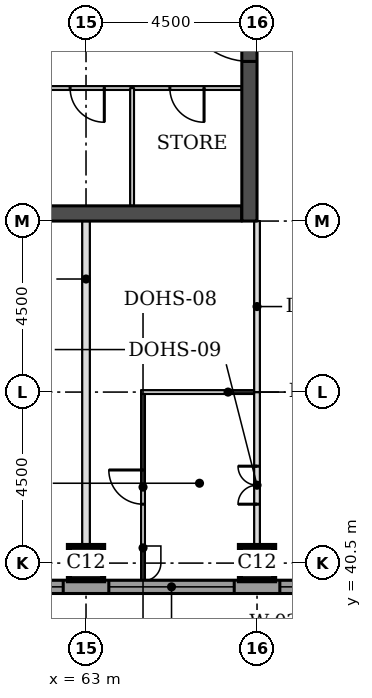
"""IFC4 building model, lengths in metres.
Left out: names, types, materials, properties, quantities, classifications, styles, units other than length and angle.
Written with IfcOpenShell. Run it as: python <this file> out.ifc"""

import sys

from ifc_helpers import new_model, si_unit, direction, frame, frame_2d, origin, origin_2d, place, context, subcontext, project, spatial, rectangle, extrude, element, fill, save


model = new_model("IFC4")
c1 = context("Model", 3, precision=1e-05, world=origin(), true_north=direction((0.0, 1.0)))
c2 = subcontext(c1, "Body", "Model", "MODEL_VIEW")
j1 = project(units=[si_unit("LENGTHUNIT", "METRE"), si_unit("PLANEANGLEUNIT", "RADIAN")], contexts=[c1])
p1 = place(None, origin())
s1 = spatial("IfcSite", under=j1, at=p1, CompositionType="ELEMENT")
p2 = place(p1, origin())
s2 = spatial("IfcBuilding", under=s1, at=p2, CompositionType="ELEMENT")
p3 = place(p2, frame((0.0, 0.0, 260.0)))
s3 = spatial("IfcBuildingStorey", under=s2, at=p3, CompositionType="ELEMENT", Elevation=260.0)
for number, where, z_axis, x_axis in (
    (1, (63.0, 40.5, 0.0), (0.0, 0.0, 1.0), (1.0, 0.0, 0.0)),
    (2, (67.5, 40.5, 0.0), (0.0, 0.0, 1.0), (1.0, 0.0, 0.0)),
):
    element("IfcColumn", number, at=place(p3, frame(where, z_axis=z_axis, x_axis=x_axis)), inside=s3, PredefinedType="COLUMN", context=c2, shape_type="SweptSolid", body=[
        extrude(rectangle(XDim=0.9, YDim=0.9, at=origin_2d()), origin(), (0.0, 0.0, 1.0), 3.7),
    ])
p4 = place(p3, frame((45.4, 49.7, 0.0), z_axis=(0.0, 0.0, 1.0), x_axis=(1.0, 0.0, 0.0)))
e3 = element("IfcWall", 3, at=p4, inside=s3, PredefinedType="SHEAR", context=c2, shape_type="SweptSolid", body=[
    extrude(rectangle(XDim=21.7, YDim=0.4, at=frame_2d((10.85, 0.0))), origin(), (0.0, 0.0, 1.0), 3.7),
])
p5 = place(p3, frame((67.3, 49.5, 0.0), z_axis=(0.0, 0.0, 1.0), x_axis=(0.0, 1.0, 0.0)))
e4 = element("IfcWall", 4, at=p5, inside=s3, PredefinedType="SHEAR", context=c2, shape_type="SweptSolid", body=[
    extrude(rectangle(XDim=22.5, YDim=0.4, at=frame_2d((11.25, 0.0))), origin(), (0.0, 0.0, 1.0), 3.7),
])
p6 = place(p5, frame((4.2, 0.0, 0.0)))
e5 = element("IfcOpeningElement", 5, at=p6, cuts=e4, PredefinedType="OPENING", context=c2, shape_type="SweptSolid", body=[
    extrude(rectangle(XDim=1.8, YDim=2.1, at=frame_2d((0.9, 1.05))), frame((0.0, 0.21, 0.0), z_axis=(0.0, -1.0, 0.0), x_axis=(1.0, 0.0, 0.0)), (0.0, 0.0, 1.0), 0.42),
])
p7 = place(p5, frame((6.9, 0.0, 0.0)))
e6 = element("IfcOpeningElement", 6, at=p7, cuts=e4, PredefinedType="OPENING", context=c2, shape_type="SweptSolid", body=[
    extrude(rectangle(XDim=1.1, YDim=2.1, at=frame_2d((0.55, 1.05))), frame((0.0, 0.21, 0.0), z_axis=(0.0, -1.0, 0.0), x_axis=(1.0, 0.0, 0.0)), (0.0, 0.0, 1.0), 0.42),
])
p8 = place(p5, frame((13.6, 0.0, 0.0)))
e7 = element("IfcOpeningElement", 7, at=p8, cuts=e4, PredefinedType="OPENING", context=c2, shape_type="SweptSolid", body=[
    extrude(rectangle(XDim=1.1, YDim=2.1, at=frame_2d((0.55, 1.05))), frame((0.0, 0.21, 0.0), z_axis=(0.0, -1.0, 0.0), x_axis=(1.0, 0.0, 0.0)), (0.0, 0.0, 1.0), 0.42),
])
p9 = place(p5, frame((16.5, 0.0, 0.0)))
e8 = element("IfcOpeningElement", 8, at=p9, cuts=e4, PredefinedType="OPENING", context=c2, shape_type="SweptSolid", body=[
    extrude(rectangle(XDim=1.8, YDim=2.1, at=frame_2d((0.9, 1.05))), frame((0.0, 0.21, 0.0), z_axis=(0.0, -1.0, 0.0), x_axis=(1.0, 0.0, 0.0)), (0.0, 0.0, 1.0), 0.42),
])
p10 = place(p3, frame((36.0, 39.875, 0.0), z_axis=(0.0, 0.0, 1.0), x_axis=(1.0, 0.0, 0.0)))
e9 = element("IfcWall", 9, at=p10, inside=s3, PredefinedType="STANDARD", context=c2, shape_type="SweptSolid", body=[
    extrude(rectangle(XDim=36.331, YDim=0.35, at=frame_2d((18.166, 0.0))), origin(), (0.0, 0.0, 1.0), 3.425),
])
p11 = place(p10, frame((0.6, 0.0, 0.9)))
e10 = element("IfcOpeningElement", 10, at=p11, cuts=e9, PredefinedType="OPENING", context=c2, shape_type="SweptSolid", body=[
    extrude(rectangle(XDim=3.3, YDim=1.9, at=frame_2d((1.65, 0.95))), frame((0.0, 0.185, 0.0), z_axis=(0.0, -1.0, 0.0), x_axis=(1.0, 0.0, 0.0)), (0.0, 0.0, 1.0), 0.37),
])
p12 = place(p10, frame((5.1, 0.0, 0.9)))
e11 = element("IfcOpeningElement", 11, at=p12, cuts=e9, PredefinedType="OPENING", context=c2, shape_type="SweptSolid", body=[
    extrude(rectangle(XDim=3.3, YDim=1.9, at=frame_2d((1.65, 0.95))), frame((0.0, 0.185, 0.0), z_axis=(0.0, -1.0, 0.0), x_axis=(1.0, 0.0, 0.0)), (0.0, 0.0, 1.0), 0.37),
])
p13 = place(p10, frame((9.6, 0.0, 0.9)))
e12 = element("IfcOpeningElement", 12, at=p13, cuts=e9, PredefinedType="OPENING", context=c2, shape_type="SweptSolid", body=[
    extrude(rectangle(XDim=3.3, YDim=1.9, at=frame_2d((1.65, 0.95))), frame((0.0, 0.185, 0.0), z_axis=(0.0, -1.0, 0.0), x_axis=(1.0, 0.0, 0.0)), (0.0, 0.0, 1.0), 0.37),
])
p14 = place(p10, frame((14.1, 0.0, 0.9)))
e13 = element("IfcOpeningElement", 13, at=p14, cuts=e9, PredefinedType="OPENING", context=c2, shape_type="SweptSolid", body=[
    extrude(rectangle(XDim=3.3, YDim=1.9, at=frame_2d((1.65, 0.95))), frame((0.0, 0.185, 0.0), z_axis=(0.0, -1.0, 0.0), x_axis=(1.0, 0.0, 0.0)), (0.0, 0.0, 1.0), 0.37),
])
p15 = place(p10, frame((18.6, 0.0, 0.9)))
e14 = element("IfcOpeningElement", 14, at=p15, cuts=e9, PredefinedType="OPENING", context=c2, shape_type="SweptSolid", body=[
    extrude(rectangle(XDim=3.3, YDim=1.9, at=frame_2d((1.65, 0.95))), frame((0.0, 0.185, 0.0), z_axis=(0.0, -1.0, 0.0), x_axis=(1.0, 0.0, 0.0)), (0.0, 0.0, 1.0), 0.37),
])
p16 = place(p10, frame((23.1, 0.0, 0.9)))
e15 = element("IfcOpeningElement", 15, at=p16, cuts=e9, PredefinedType="OPENING", context=c2, shape_type="SweptSolid", body=[
    extrude(rectangle(XDim=3.3, YDim=1.9, at=frame_2d((1.65, 0.95))), frame((0.0, 0.185, 0.0), z_axis=(0.0, -1.0, 0.0), x_axis=(1.0, 0.0, 0.0)), (0.0, 0.0, 1.0), 0.37),
])
p17 = place(p10, frame((27.6, 0.0, 0.9)))
e16 = element("IfcOpeningElement", 16, at=p17, cuts=e9, PredefinedType="OPENING", context=c2, shape_type="SweptSolid", body=[
    extrude(rectangle(XDim=3.3, YDim=1.9, at=frame_2d((1.65, 0.95))), frame((0.0, 0.185, 0.0), z_axis=(0.0, -1.0, 0.0), x_axis=(1.0, 0.0, 0.0)), (0.0, 0.0, 1.0), 0.37),
])
p18 = place(p10, frame((32.1, 0.0, 0.9)))
e17 = element("IfcOpeningElement", 17, at=p18, cuts=e9, PredefinedType="OPENING", context=c2, shape_type="SweptSolid", body=[
    extrude(rectangle(XDim=3.3, YDim=1.9, at=frame_2d((1.65, 0.95))), frame((0.0, 0.185, 0.0), z_axis=(0.0, -1.0, 0.0), x_axis=(1.0, 0.0, 0.0)), (0.0, 0.0, 1.0), 0.37),
])
p19 = place(p3, frame((64.45, 45.0, 0.0), z_axis=(0.0, 0.0, 1.0), x_axis=(1.0, 0.0, 0.0)))
e18 = element("IfcWall", 18, at=p19, inside=s3, PredefinedType="PARTITIONING", context=c2, shape_type="SweptSolid", body=[
    extrude(rectangle(XDim=2.975, YDim=0.1, at=frame_2d((1.488, 0.0))), origin(), (0.0, 0.0, 1.0), 3.45),
])
p20 = place(p3, frame((63.0, 40.05, 0.0), z_axis=(0.0, 0.0, 1.0), x_axis=(0.0, 1.0, 0.0)))
e19 = element("IfcWall", 19, at=p20, inside=s3, PredefinedType="PARTITIONING", context=c2, shape_type="SweptSolid", body=[
    extrude(rectangle(XDim=9.45, YDim=0.2, at=frame_2d((4.725, 0.0))), origin(), (0.0, 0.0, 1.0), 3.45),
])
p21 = place(p3, frame((64.5, 40.05, 0.0), z_axis=(0.0, 0.0, 1.0), x_axis=(0.0, 1.0, 0.0)))
e20 = element("IfcWall", 20, at=p21, inside=s3, PredefinedType="PARTITIONING", context=c2, shape_type="SweptSolid", body=[
    extrude(rectangle(XDim=4.9, YDim=0.1, at=frame_2d((2.45, 0.0))), origin(), (0.0, 0.0, 1.0), 3.45),
])
p22 = place(p21, frame((2.0, 0.0, 0.0)))
e21 = element("IfcOpeningElement", 21, at=p22, cuts=e20, PredefinedType="OPENING", context=c2, shape_type="SweptSolid", body=[
    extrude(rectangle(XDim=0.9, YDim=2.1, at=frame_2d((0.45, 1.05))), frame((0.0, 0.06, 0.0), z_axis=(0.0, -1.0, 0.0), x_axis=(1.0, 0.0, 0.0)), (0.0, 0.0, 1.0), 0.12),
])
p23 = place(p3, frame((67.5, 40.05, 0.0), z_axis=(0.0, 0.0, 1.0), x_axis=(0.0, 1.0, 0.0)))
e22 = element("IfcWall", 22, at=p23, inside=s3, PredefinedType="PARTITIONING", context=c2, shape_type="SweptSolid", body=[
    extrude(rectangle(XDim=4.95, YDim=0.15, at=frame_2d((2.475, 0.0))), origin(), (0.0, 0.0, 1.0), 2.922),
])
p24 = place(p23, frame((2.0, 0.0, 0.0)))
e23 = element("IfcOpeningElement", 23, at=p24, cuts=e22, PredefinedType="OPENING", context=c2, shape_type="SweptSolid", body=[
    extrude(rectangle(XDim=1.0, YDim=2.1, at=frame_2d((0.5, 1.05))), frame((0.0, 0.085, 0.0), z_axis=(0.0, -1.0, 0.0), x_axis=(1.0, 0.0, 0.0)), (0.0, 0.0, 1.0), 0.17),
])
p25 = place(p3, frame((67.5, 45.0, 0.0), z_axis=(0.0, 0.0, 1.0), x_axis=(0.0, 1.0, 0.0)))
e24 = element("IfcWall", 24, at=p25, inside=s3, PredefinedType="PARTITIONING", context=c2, shape_type="SweptSolid", body=[
    extrude(rectangle(XDim=4.5, YDim=0.15, at=frame_2d((2.25, 0.0))), origin(), (0.0, 0.0, 1.0), 2.922),
])
p26 = place(p3, frame((45.4, 53.0, 0.0), z_axis=(0.0, 0.0, 1.0), x_axis=(1.0, 0.0, 0.0)))
e25 = element("IfcWall", 25, at=p26, inside=s3, PredefinedType="PARTITIONING", context=c2, shape_type="SweptSolid", body=[
    extrude(rectangle(XDim=21.7, YDim=0.1, at=frame_2d((10.85, 0.0))), origin(), (0.0, 0.0, 1.0), 3.45),
])
p27 = place(p26, frame((19.806, 0.0, 0.0)))
e26 = element("IfcOpeningElement", 26, at=p27, cuts=e25, PredefinedType="OPENING", context=c2, shape_type="SweptSolid", body=[
    extrude(rectangle(XDim=0.9, YDim=2.1, at=frame_2d((0.45, 1.05))), frame((0.0, 0.06, 0.0), z_axis=(0.0, -1.0, 0.0), x_axis=(1.0, 0.0, 0.0)), (0.0, 0.0, 1.0), 0.12),
])
p28 = place(p26, frame((17.181, 0.0, 0.0)))
e27 = element("IfcOpeningElement", 27, at=p28, cuts=e25, PredefinedType="OPENING", context=c2, shape_type="SweptSolid", body=[
    extrude(rectangle(XDim=0.9, YDim=2.1, at=frame_2d((0.45, 1.05))), frame((0.0, 0.06, 0.0), z_axis=(0.0, -1.0, 0.0), x_axis=(1.0, 0.0, 0.0)), (0.0, 0.0, 1.0), 0.12),
])
p29 = place(p26, frame((0.442, 0.0, 0.0)))
e28 = element("IfcOpeningElement", 28, at=p29, cuts=e25, PredefinedType="OPENING", context=c2, shape_type="SweptSolid", body=[
    extrude(rectangle(XDim=0.9, YDim=2.1, at=frame_2d((0.45, 1.05))), frame((0.0, 0.06, 0.0), z_axis=(0.0, -1.0, 0.0), x_axis=(1.0, 0.0, 0.0)), (0.0, 0.0, 1.0), 0.12),
])
p30 = place(p26, frame((2.151, 0.0, 0.0)))
e29 = element("IfcOpeningElement", 29, at=p30, cuts=e25, PredefinedType="OPENING", context=c2, shape_type="SweptSolid", body=[
    extrude(rectangle(XDim=1.0, YDim=2.1, at=frame_2d((0.5, 1.05))), frame((0.0, 0.06, 0.0), z_axis=(0.0, -1.0, 0.0), x_axis=(1.0, 0.0, 0.0)), (0.0, 0.0, 1.0), 0.12),
])
p31 = place(p26, frame((3.934, 0.0, 0.0)))
e30 = element("IfcOpeningElement", 30, at=p31, cuts=e25, PredefinedType="OPENING", context=c2, shape_type="SweptSolid", body=[
    extrude(rectangle(XDim=0.9, YDim=2.1, at=frame_2d((0.45, 1.05))), frame((0.0, 0.06, 0.0), z_axis=(0.0, -1.0, 0.0), x_axis=(1.0, 0.0, 0.0)), (0.0, 0.0, 1.0), 0.12),
])
p32 = place(p26, frame((6.816, 0.0, 0.0)))
e31 = element("IfcOpeningElement", 31, at=p32, cuts=e25, PredefinedType="OPENING", context=c2, shape_type="SweptSolid", body=[
    extrude(rectangle(XDim=0.9, YDim=2.1, at=frame_2d((0.45, 1.05))), frame((0.0, 0.06, 0.0), z_axis=(0.0, -1.0, 0.0), x_axis=(1.0, 0.0, 0.0)), (0.0, 0.0, 1.0), 0.12),
])
p33 = place(p26, frame((12.416, 0.0, 0.0)))
e32 = element("IfcOpeningElement", 32, at=p33, cuts=e25, PredefinedType="OPENING", context=c2, shape_type="SweptSolid", body=[
    extrude(rectangle(XDim=0.9, YDim=2.1, at=frame_2d((0.45, 1.05))), frame((0.0, 0.06, 0.0), z_axis=(0.0, -1.0, 0.0), x_axis=(1.0, 0.0, 0.0)), (0.0, 0.0, 1.0), 0.12),
])
p34 = place(p3, frame((64.212, 49.9, 0.0), z_axis=(0.0, 0.0, 1.0), x_axis=(0.0, 1.0, 0.0)))
e33 = element("IfcWall", 33, at=p34, inside=s3, PredefinedType="PARTITIONING", context=c2, shape_type="SweptSolid", body=[
    extrude(rectangle(XDim=3.1, YDim=0.1, at=frame_2d((1.55, 0.0))), origin(), (0.0, 0.0, 1.0), 3.45),
])
p35 = place(p16, origin())
e34 = element("IfcWindow", 34, at=p35, inside=s3, PartitioningType="SINGLE_PANEL", PredefinedType="WINDOW", context=c2, shape_type="SweptSolid", body=[
    extrude(rectangle(XDim=3.3, YDim=1.9, at=frame_2d((1.65, 0.95))), frame((0.0, 0.085, 0.0), z_axis=(0.0, -1.0, 0.0), x_axis=(1.0, 0.0, 0.0)), (0.0, 0.0, 1.0), 0.06),
])
fill(e15, e34)
p36 = place(p17, origin())
e35 = element("IfcWindow", 35, at=p36, inside=s3, PartitioningType="SINGLE_PANEL", PredefinedType="WINDOW", context=c2, shape_type="SweptSolid", body=[
    extrude(rectangle(XDim=3.3, YDim=1.9, at=frame_2d((1.65, 0.95))), frame((0.0, 0.085, 0.0), z_axis=(0.0, -1.0, 0.0), x_axis=(1.0, 0.0, 0.0)), (0.0, 0.0, 1.0), 0.06),
])
fill(e16, e35)
p37 = place(p18, origin())
e36 = element("IfcWindow", 36, at=p37, inside=s3, PartitioningType="SINGLE_PANEL", PredefinedType="WINDOW", context=c2, shape_type="SweptSolid", body=[
    extrude(rectangle(XDim=3.3, YDim=1.9, at=frame_2d((1.65, 0.95))), frame((0.0, 0.085, 0.0), z_axis=(0.0, -1.0, 0.0), x_axis=(1.0, 0.0, 0.0)), (0.0, 0.0, 1.0), 0.06),
])
fill(e17, e36)
p38 = place(p24, origin())
e37 = element("IfcDoor", 37, at=p38, inside=s3, OperationType="DOUBLE_DOOR_SINGLE_SWING", PredefinedType="DOOR", context=c2, shape_type="SweptSolid", body=[
    extrude(rectangle(XDim=1.0, YDim=2.1, at=frame_2d((0.5, 1.05))), frame((0.0, 0.025, 0.0), z_axis=(0.0, -1.0, 0.0), x_axis=(1.0, 0.0, 0.0)), (0.0, 0.0, 1.0), 0.05),
])
fill(e23, e37)
p39 = place(p22, origin())
e38 = element("IfcDoor", 38, at=p39, inside=s3, OperationType="SINGLE_SWING_RIGHT", PredefinedType="DOOR", context=c2, shape_type="SweptSolid", body=[
    extrude(rectangle(XDim=0.9, YDim=2.1, at=frame_2d((0.45, 1.05))), frame((0.0, 0.025, 0.0), z_axis=(0.0, -1.0, 0.0), x_axis=(1.0, 0.0, 0.0)), (0.0, 0.0, 1.0), 0.05),
])
fill(e21, e38)
p40 = place(p6, origin())
e39 = element("IfcDoor", 39, at=p40, inside=s3, OperationType="SINGLE_SWING_RIGHT", PredefinedType="DOOR", context=c2, shape_type="SweptSolid", body=[
    extrude(rectangle(XDim=1.8, YDim=2.1, at=frame_2d((0.9, 1.05))), frame((0.0, 0.025, 0.0), z_axis=(0.0, -1.0, 0.0), x_axis=(1.0, 0.0, 0.0)), (0.0, 0.0, 1.0), 0.05),
])
fill(e5, e39)
p41 = place(p27, frame((0.9, 0.0, 0.0), z_axis=(0.0, 0.0, 1.0), x_axis=(-1.0, 0.0, 0.0)))
e40 = element("IfcDoor", 40, at=p41, inside=s3, OperationType="SINGLE_SWING_LEFT", PredefinedType="DOOR", context=c2, shape_type="SweptSolid", body=[
    extrude(rectangle(XDim=0.9, YDim=2.1, at=frame_2d((0.45, 1.05))), frame((0.0, 0.025, 0.0), z_axis=(0.0, -1.0, 0.0), x_axis=(1.0, 0.0, 0.0)), (0.0, 0.0, 1.0), 0.05),
])
fill(e26, e40)
p42 = place(p28, frame((0.9, 0.0, 0.0), z_axis=(0.0, 0.0, 1.0), x_axis=(-1.0, 0.0, 0.0)))
e41 = element("IfcDoor", 41, at=p42, inside=s3, OperationType="SINGLE_SWING_LEFT", PredefinedType="DOOR", context=c2, shape_type="SweptSolid", body=[
    extrude(rectangle(XDim=0.9, YDim=2.1, at=frame_2d((0.45, 1.05))), frame((0.0, 0.025, 0.0), z_axis=(0.0, -1.0, 0.0), x_axis=(1.0, 0.0, 0.0)), (0.0, 0.0, 1.0), 0.05),
])
fill(e27, e41)
save(model, sys.argv[1])
